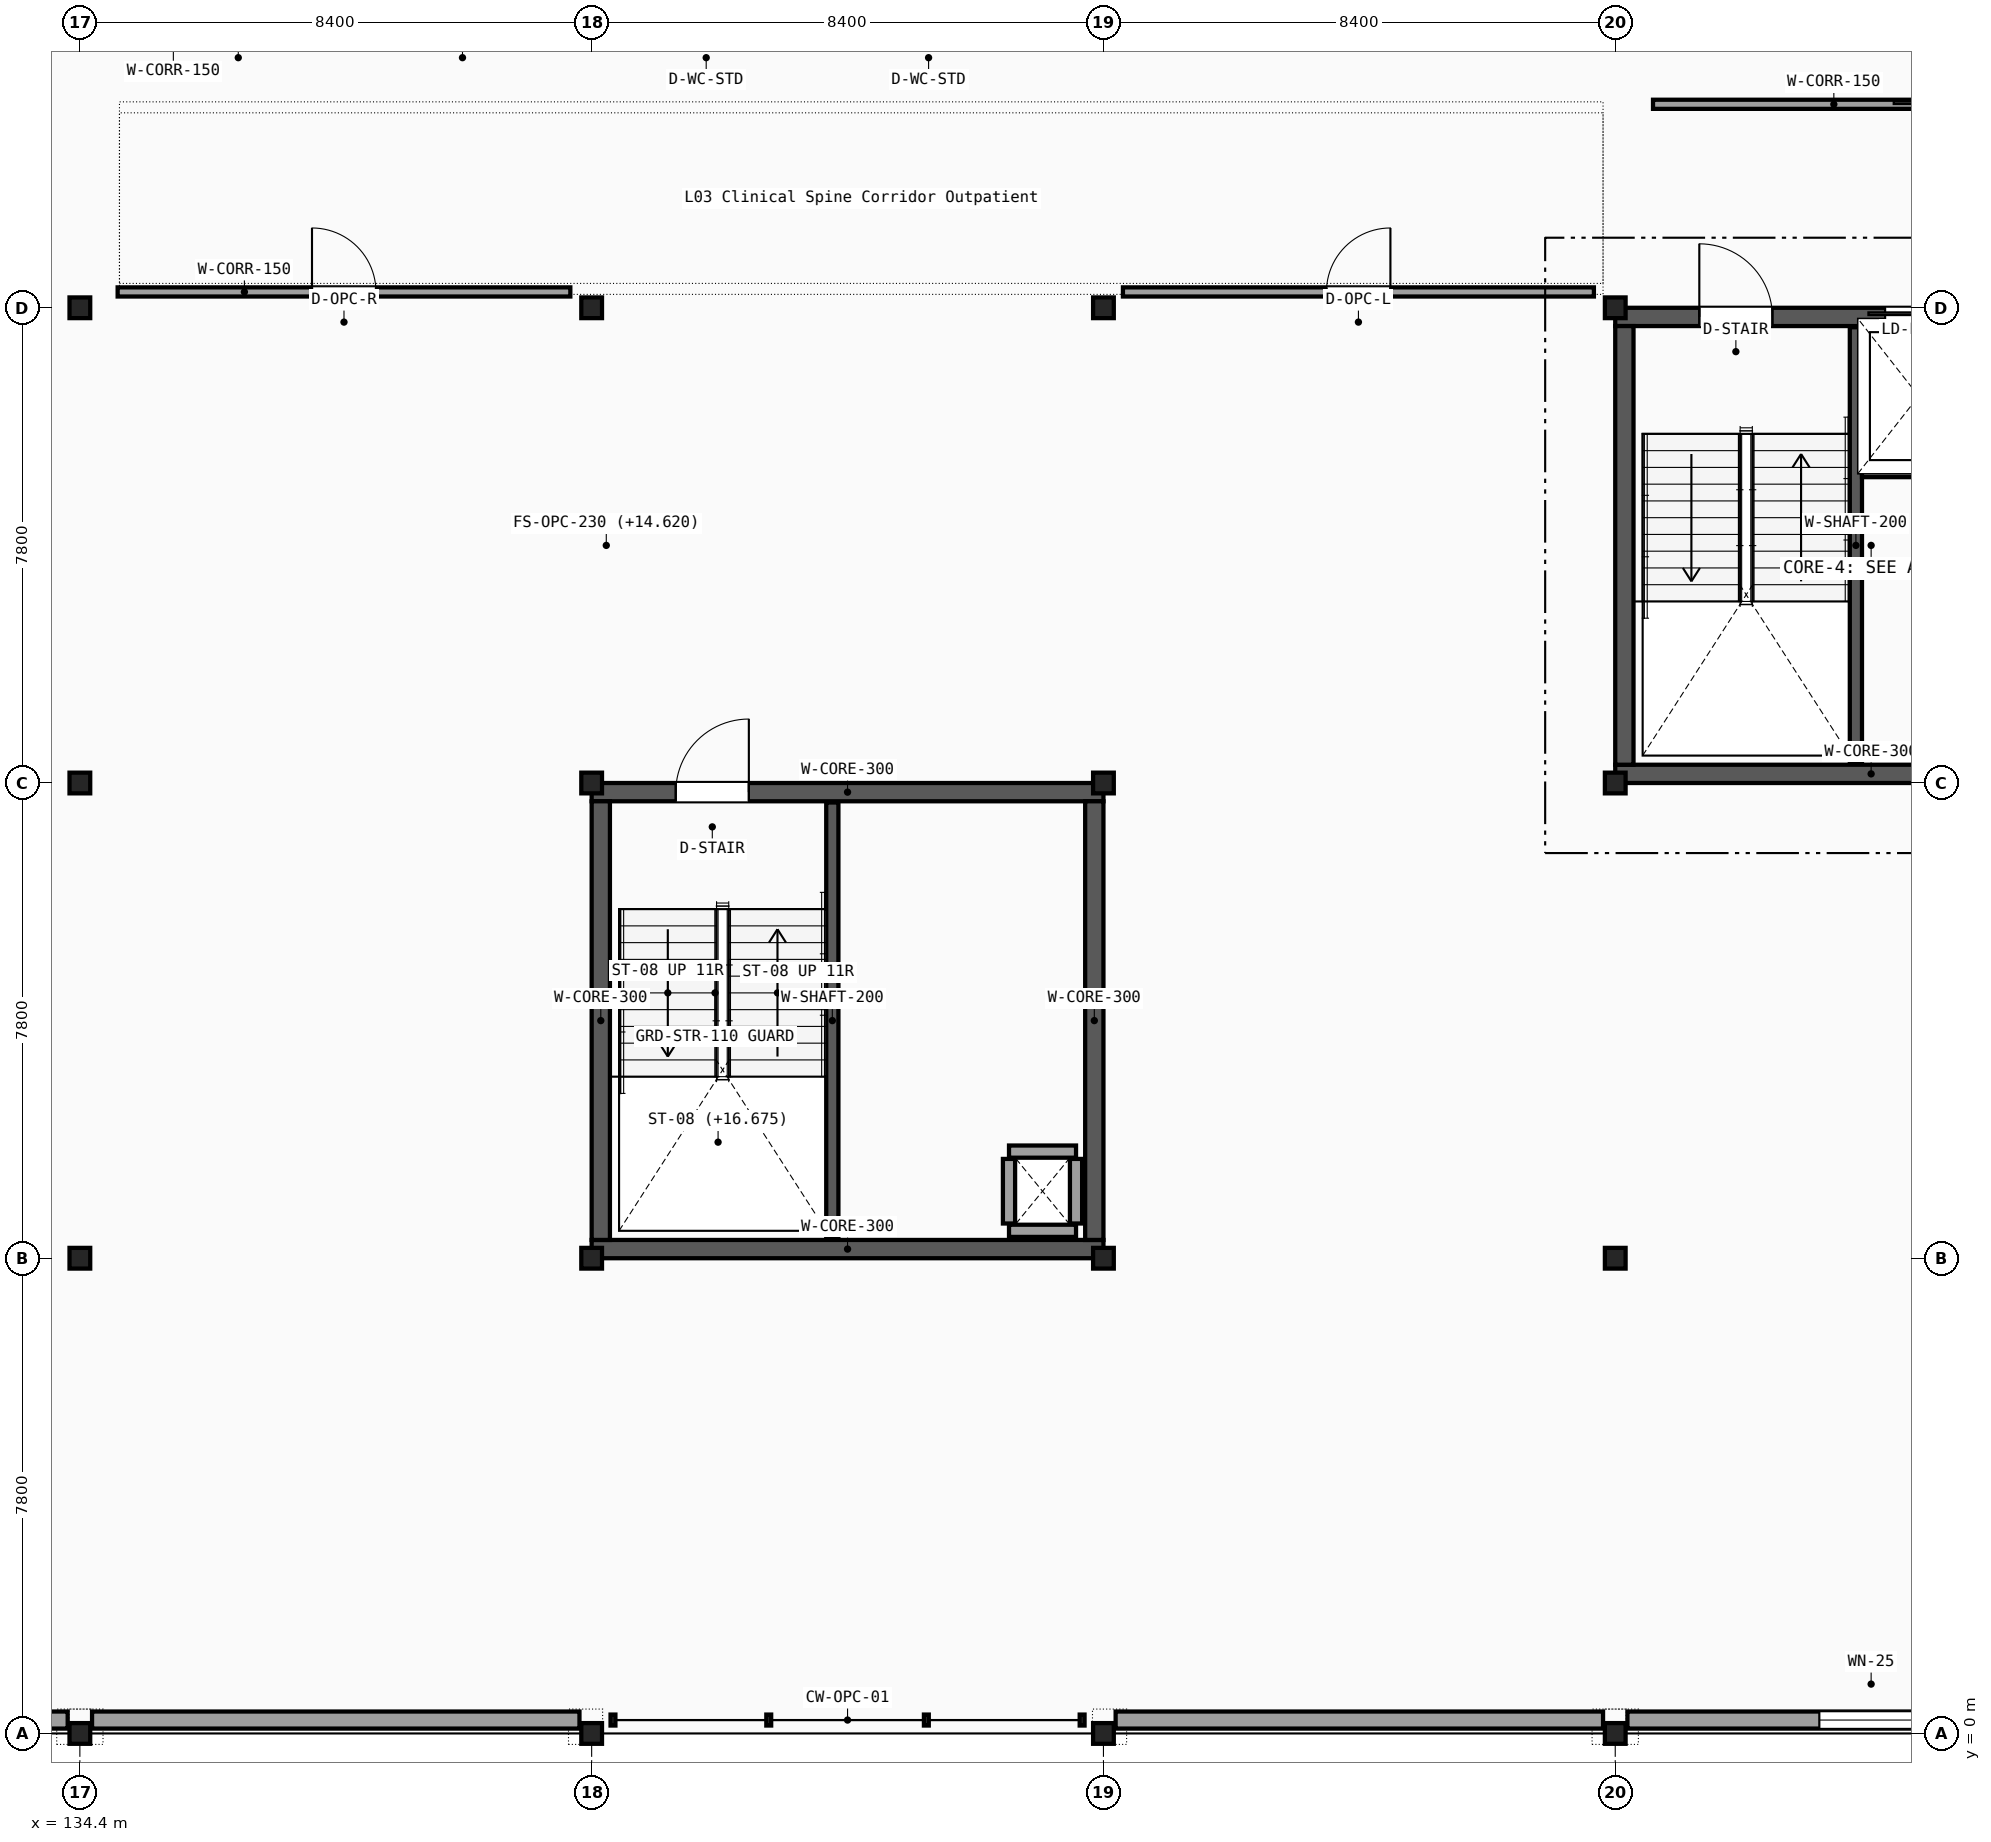
"""IFC4 building model, lengths in metres.
Left out: names, types, materials, properties, quantities, classifications, styles, units other than length and angle.
Written with IfcOpenShell. Run it as: python <this file> out.ifc"""

import sys

from ifc_helpers import new_model, si_unit, direction, frame, frame_2d, origin, origin_2d, place, context, subcontext, project, spatial, rectangle, i_section, extrude, element, fill, save


model = new_model("IFC4")
c1 = context("Model", 3, precision=1e-05, world=origin(), true_north=direction((0.0, 1.0)))
c2 = subcontext(c1, "Body", "Model", "MODEL_VIEW")
j1 = project(units=[si_unit("LENGTHUNIT", "METRE"), si_unit("PLANEANGLEUNIT", "RADIAN")], contexts=[c1])
p1 = place(None, origin())
s1 = spatial("IfcSite", under=j1, at=p1, CompositionType="ELEMENT")
p2 = place(p1, origin())
s2 = spatial("IfcBuilding", under=s1, at=p2, CompositionType="ELEMENT")
p3 = place(p2, frame((0.0, 0.0, 14.85)))
s3 = spatial("IfcBuildingStorey", under=s2, at=p3, CompositionType="ELEMENT", Elevation=14.85)
for number, where, z_axis, x_axis in (
    (1, (134.4, 0.0, 0.0), (0.0, 0.0, 1.0), (1.0, 0.0, 0.0)),
    (2, (134.4, 7.8, 0.0), (0.0, 0.0, 1.0), (1.0, 0.0, 0.0)),
    (3, (134.4, 15.6, 0.0), (0.0, 0.0, 1.0), (1.0, 0.0, 0.0)),
    (4, (134.4, 23.4, 0.0), (0.0, 0.0, 1.0), (1.0, 0.0, 0.0)),
    (5, (142.8, 0.0, 0.0), (0.0, 0.0, 1.0), (1.0, 0.0, 0.0)),
    (6, (142.8, 7.8, 0.0), (0.0, 0.0, 1.0), (1.0, 0.0, 0.0)),
    (7, (142.8, 15.6, 0.0), (0.0, 0.0, 1.0), (1.0, 0.0, 0.0)),
    (8, (142.8, 23.4, 0.0), (0.0, 0.0, 1.0), (1.0, 0.0, 0.0)),
    (9, (151.2, 0.0, 0.0), (0.0, 0.0, 1.0), (1.0, 0.0, 0.0)),
    (10, (151.2, 7.8, 0.0), (0.0, 0.0, 1.0), (1.0, 0.0, 0.0)),
    (11, (151.2, 15.6, 0.0), (0.0, 0.0, 1.0), (1.0, 0.0, 0.0)),
    (12, (151.2, 23.4, 0.0), (0.0, 0.0, 1.0), (1.0, 0.0, 0.0)),
    (13, (159.6, 0.0, 0.0), (0.0, 0.0, 1.0), (1.0, 0.0, 0.0)),
    (14, (159.6, 7.8, 0.0), (0.0, 0.0, 1.0), (1.0, 0.0, 0.0)),
    (15, (159.6, 15.6, 0.0), (0.0, 0.0, 1.0), (1.0, 0.0, 0.0)),
    (16, (159.6, 23.4, 0.0), (0.0, 0.0, 1.0), (1.0, 0.0, 0.0)),
):
    element("IfcColumn", number, at=place(p3, frame(where, z_axis=z_axis, x_axis=x_axis)), inside=s3, PredefinedType="COLUMN", context=c2, shape_type="SweptSolid", body=[
        extrude(i_section(OverallWidth=0.3, OverallDepth=0.34, WebThickness=0.012, FlangeThickness=0.021, FilletRadius=0.027, at=origin_2d()), origin(), (0.0, 0.0, 1.0), 4.05),
    ])
p4 = place(p3, frame((126.2, 0.22, 0.0), z_axis=(0.0, 0.0, 1.0), x_axis=(1.0, 0.0, 0.0)))
e17 = element("IfcWall", 17, at=p4, inside=s3, PredefinedType="SOLIDWALL", context=c2, shape_type="SweptSolid", body=[
    extrude(rectangle(XDim=8.0, YDim=0.28, at=frame_2d((4.0, 0.0))), origin(), (0.0, 0.0, 1.0), 3.42),
])
p5 = place(p4, frame((3.225, 0.0, 0.8)))
e18 = element("IfcOpeningElement", 18, at=p5, cuts=e17, PredefinedType="OPENING", context=c2, shape_type="SweptSolid", body=[
    extrude(rectangle(XDim=1.55, YDim=1.7, at=frame_2d((0.775, 0.85))), frame((0.0, 0.15, 0.0), z_axis=(0.0, -1.0, 0.0), x_axis=(1.0, 0.0, 0.0)), (0.0, 0.0, 1.0), 0.3),
])
p6 = place(p3, frame((134.6, 0.22, 0.0), z_axis=(0.0, 0.0, 1.0), x_axis=(1.0, 0.0, 0.0)))
e19 = element("IfcWall", 19, at=p6, inside=s3, PredefinedType="SOLIDWALL", context=c2, shape_type="SweptSolid", body=[
    extrude(rectangle(XDim=8.0, YDim=0.28, at=frame_2d((4.0, 0.0))), origin(), (0.0, 0.0, 1.0), 3.41),
])
p7 = place(p3, frame((151.4, 0.22, 0.0), z_axis=(0.0, 0.0, 1.0), x_axis=(1.0, 0.0, 0.0)))
e20 = element("IfcWall", 20, at=p7, inside=s3, PredefinedType="SOLIDWALL", context=c2, shape_type="SweptSolid", body=[
    extrude(rectangle(XDim=8.0, YDim=0.28, at=frame_2d((4.0, 0.0))), origin(), (0.0, 0.0, 1.0), 3.4),
])
p8 = place(p3, frame((159.8, 0.22, 0.0), z_axis=(0.0, 0.0, 1.0), x_axis=(1.0, 0.0, 0.0)))
e21 = element("IfcWall", 21, at=p8, inside=s3, PredefinedType="SOLIDWALL", context=c2, shape_type="SweptSolid", body=[
    extrude(rectangle(XDim=8.0, YDim=0.28, at=frame_2d((4.0, 0.0))), origin(), (0.0, 0.0, 1.0), 3.4),
])
p9 = place(p8, frame((3.15, 0.0, 0.95)))
e22 = element("IfcOpeningElement", 22, at=p9, cuts=e21, PredefinedType="OPENING", context=c2, shape_type="SweptSolid", body=[
    extrude(rectangle(XDim=1.7, YDim=1.55, at=frame_2d((0.85, 0.775))), frame((0.0, 0.15, 0.0), z_axis=(0.0, -1.0, 0.0), x_axis=(1.0, 0.0, 0.0)), (0.0, 0.0, 1.0), 0.3),
])
p10 = place(p3, frame((159.6, 15.75, 0.0), z_axis=(0.0, 0.0, 1.0), x_axis=(1.0, 0.0, 0.0)))
e23 = element("IfcWall", 23, at=p10, inside=s3, PredefinedType="SHEAR", context=c2, shape_type="SweptSolid", body=[
    extrude(rectangle(XDim=8.4, YDim=0.3, at=frame_2d((4.2, 0.0))), origin(), (0.0, 0.0, 1.0), 3.82),
])
p11 = place(p3, frame((159.6, 23.25, 0.0), z_axis=(0.0, 0.0, 1.0), x_axis=(1.0, 0.0, 0.0)))
e24 = element("IfcWall", 24, at=p11, inside=s3, PredefinedType="SHEAR", context=c2, shape_type="SweptSolid", body=[
    extrude(rectangle(XDim=8.4, YDim=0.3, at=frame_2d((4.2, 0.0))), origin(), (0.0, 0.0, 1.0), 3.82),
])
p12 = place(p11, frame((1.38, 0.0, 0.0)))
e25 = element("IfcOpeningElement", 25, at=p12, cuts=e24, PredefinedType="OPENING", context=c2, shape_type="SweptSolid", body=[
    extrude(rectangle(XDim=1.2, YDim=2.15, at=frame_2d((0.6, 1.075))), frame((0.0, 0.16, 0.0), z_axis=(0.0, -1.0, 0.0), x_axis=(1.0, 0.0, 0.0)), (0.0, 0.0, 1.0), 0.32),
])
p13 = place(p11, frame((4.43, 0.0, 0.0)))
e26 = element("IfcOpeningElement", 26, at=p13, cuts=e24, PredefinedType="OPENING", context=c2, shape_type="SweptSolid", body=[
    extrude(rectangle(XDim=1.1, YDim=2.15, at=frame_2d((0.55, 1.075))), frame((0.0, 0.16, 0.0), z_axis=(0.0, -1.0, 0.0), x_axis=(1.0, 0.0, 0.0)), (0.0, 0.0, 1.0), 0.32),
])
p14 = place(p11, frame((6.45, 0.0, 0.0)))
e27 = element("IfcOpeningElement", 27, at=p14, cuts=e24, PredefinedType="OPENING", context=c2, shape_type="SweptSolid", body=[
    extrude(rectangle(XDim=1.1, YDim=2.15, at=frame_2d((0.55, 1.075))), frame((0.0, 0.16, 0.0), z_axis=(0.0, -1.0, 0.0), x_axis=(1.0, 0.0, 0.0)), (0.0, 0.0, 1.0), 0.32),
])
p15 = place(p3, frame((159.75, 15.9, 0.0), z_axis=(0.0, 0.0, 1.0), x_axis=(0.0, 1.0, 0.0)))
e28 = element("IfcWall", 28, at=p15, inside=s3, PredefinedType="SHEAR", context=c2, shape_type="SweptSolid", body=[
    extrude(rectangle(XDim=7.2, YDim=0.3, at=frame_2d((3.6, 0.0))), origin(), (0.0, 0.0, 1.0), 3.82),
])
p16 = place(p3, frame((163.55, 15.92, 0.0), z_axis=(0.0, 0.0, 1.0), x_axis=(0.0, 1.0, 0.0)))
e29 = element("IfcWall", 29, at=p16, inside=s3, PredefinedType="SHEAR", context=c2, shape_type="SweptSolid", body=[
    extrude(rectangle(XDim=7.16, YDim=0.2, at=frame_2d((3.58, 0.0))), origin(), (0.0, 0.0, 1.0), 3.82),
])
p17 = place(p3, frame((163.65, 20.72, 0.0), z_axis=(0.0, 0.0, 1.0), x_axis=(1.0, 0.0, 0.0)))
e30 = element("IfcWall", 30, at=p17, inside=s3, PredefinedType="PARTITIONING", context=c2, shape_type="SweptSolid", body=[
    extrude(rectangle(XDim=1.86, YDim=0.2, at=frame_2d((0.93, 0.0))), origin(), (0.0, 0.0, 1.0), 3.2),
])
p18 = place(p3, frame((142.8, 7.95, 0.0), z_axis=(0.0, 0.0, 1.0), x_axis=(1.0, 0.0, 0.0)))
e31 = element("IfcWall", 31, at=p18, inside=s3, PredefinedType="SHEAR", context=c2, shape_type="SweptSolid", body=[
    extrude(rectangle(XDim=8.4, YDim=0.3, at=frame_2d((4.2, 0.0))), origin(), (0.0, 0.0, 1.0), 3.82),
])
p19 = place(p3, frame((142.8, 15.45, 0.0), z_axis=(0.0, 0.0, 1.0), x_axis=(1.0, 0.0, 0.0)))
e32 = element("IfcWall", 32, at=p19, inside=s3, PredefinedType="SHEAR", context=c2, shape_type="SweptSolid", body=[
    extrude(rectangle(XDim=8.4, YDim=0.3, at=frame_2d((4.2, 0.0))), origin(), (0.0, 0.0, 1.0), 3.82),
])
p20 = place(p19, frame((1.38, 0.0, 0.0)))
e33 = element("IfcOpeningElement", 33, at=p20, cuts=e32, PredefinedType="OPENING", context=c2, shape_type="SweptSolid", body=[
    extrude(rectangle(XDim=1.2, YDim=2.15, at=frame_2d((0.6, 1.075))), frame((0.0, 0.16, 0.0), z_axis=(0.0, -1.0, 0.0), x_axis=(1.0, 0.0, 0.0)), (0.0, 0.0, 1.0), 0.32),
])
for number, where, z_axis, x_axis in (
    (34, (142.95, 8.1, 0.0), (0.0, 0.0, 1.0), (0.0, 1.0, 0.0)),
    (35, (151.05, 8.1, 0.0), (0.0, 0.0, 1.0), (0.0, 1.0, 0.0)),
):
    element("IfcWall", number, at=place(p3, frame(where, z_axis=z_axis, x_axis=x_axis)), inside=s3, PredefinedType="SHEAR", context=c2, shape_type="SweptSolid", body=[
        extrude(rectangle(XDim=7.2, YDim=0.3, at=frame_2d((3.6, 0.0))), origin(), (0.0, 0.0, 1.0), 3.82),
    ])
p21 = place(p3, frame((146.75, 8.12, 0.0), z_axis=(0.0, 0.0, 1.0), x_axis=(0.0, 1.0, 0.0)))
e36 = element("IfcWall", 36, at=p21, inside=s3, PredefinedType="SHEAR", context=c2, shape_type="SweptSolid", body=[
    extrude(rectangle(XDim=7.16, YDim=0.2, at=frame_2d((3.58, 0.0))), origin(), (0.0, 0.0, 1.0), 3.82),
])
for number, where, z_axis, x_axis in (
    (37, (149.65, 8.25, 0.0), (0.0, 0.0, 1.0), (1.0, 0.0, 0.0)),
    (38, (149.65, 9.55, 0.0), (0.0, 0.0, 1.0), (1.0, 0.0, 0.0)),
):
    element("IfcWall", number, at=place(p3, frame(where, z_axis=z_axis, x_axis=x_axis)), inside=s3, PredefinedType="PARTITIONING", context=c2, shape_type="SweptSolid", body=[
        extrude(rectangle(XDim=1.1, YDim=0.2, at=frame_2d((0.55, 0.0))), origin(), (0.0, 0.0, 1.0), 3.2),
    ])
for number, where, z_axis, x_axis in (
    (39, (149.65, 8.37, 0.0), (0.0, 0.0, 1.0), (0.0, 1.0, 0.0)),
    (40, (150.75, 8.37, 0.0), (0.0, 0.0, 1.0), (0.0, 1.0, 0.0)),
):
    element("IfcWall", number, at=place(p3, frame(where, z_axis=z_axis, x_axis=x_axis)), inside=s3, PredefinedType="PARTITIONING", context=c2, shape_type="SweptSolid", body=[
        extrude(rectangle(XDim=1.06, YDim=0.2, at=frame_2d((0.53, 0.0))), origin(), (0.0, 0.0, 1.0), 3.2),
    ])
p22 = place(p3, frame((135.02, 23.66, 0.0), z_axis=(0.0, 0.0, 1.0), x_axis=(1.0, 0.0, 0.0)))
e41 = element("IfcWall", 41, at=p22, inside=s3, PredefinedType="PARTITIONING", context=c2, shape_type="SweptSolid", body=[
    extrude(rectangle(XDim=7.43, YDim=0.15, at=frame_2d((3.715, 0.0))), origin(), (0.0, 0.0, 1.0), 3.42),
])
p23 = place(p22, frame((3.19, 0.0, 0.0)))
e42 = element("IfcOpeningElement", 42, at=p23, cuts=e41, PredefinedType="OPENING", context=c2, shape_type="SweptSolid", body=[
    extrude(rectangle(XDim=1.05, YDim=2.15, at=frame_2d((0.525, 1.075))), frame((0.0, 0.085, 0.0), z_axis=(0.0, -1.0, 0.0), x_axis=(1.0, 0.0, 0.0)), (0.0, 0.0, 1.0), 0.17),
])
p24 = place(p3, frame((151.52, 23.66, 0.0), z_axis=(0.0, 0.0, 1.0), x_axis=(1.0, 0.0, 0.0)))
e43 = element("IfcWall", 43, at=p24, inside=s3, PredefinedType="PARTITIONING", context=c2, shape_type="SweptSolid", body=[
    extrude(rectangle(XDim=7.73, YDim=0.15, at=frame_2d((3.865, 0.0))), origin(), (0.0, 0.0, 1.0), 3.2),
])
p25 = place(p24, frame((3.34, 0.0, 0.0)))
e44 = element("IfcOpeningElement", 44, at=p25, cuts=e43, PredefinedType="OPENING", context=c2, shape_type="SweptSolid", body=[
    extrude(rectangle(XDim=1.05, YDim=2.15, at=frame_2d((0.525, 1.075))), frame((0.0, 0.085, 0.0), z_axis=(0.0, -1.0, 0.0), x_axis=(1.0, 0.0, 0.0)), (0.0, 0.0, 1.0), 0.17),
])
p26 = place(p3, frame((160.22, 26.74, 0.0), z_axis=(0.0, 0.0, 1.0), x_axis=(1.0, 0.0, 0.0)))
e45 = element("IfcWall", 45, at=p26, inside=s3, PredefinedType="PARTITIONING", context=c2, shape_type="SweptSolid", body=[
    extrude(rectangle(XDim=10.6, YDim=0.15, at=frame_2d((5.3, 0.0))), origin(), (0.0, 0.0, 1.0), 3.4),
])
p27 = place(p26, frame((4.4, 0.0, 0.0)))
e46 = element("IfcOpeningElement", 46, at=p27, cuts=e45, PredefinedType="OPENING", context=c2, shape_type="SweptSolid", body=[
    extrude(rectangle(XDim=1.8, YDim=2.4, at=frame_2d((0.9, 1.2))), frame((0.0, 0.085, 0.0), z_axis=(0.0, -1.0, 0.0), x_axis=(1.0, 0.0, 0.0)), (0.0, 0.0, 1.0), 0.17),
])
p28 = place(p9, origin())
e47 = element("IfcWindow", 47, at=p28, inside=s3, PartitioningType="SINGLE_PANEL", PredefinedType="WINDOW", context=c2, shape_type="SweptSolid", body=[
    extrude(rectangle(XDim=1.7, YDim=1.55, at=frame_2d((0.85, 0.775))), frame((0.0, 0.03, 0.0), z_axis=(0.0, -1.0, 0.0), x_axis=(1.0, 0.0, 0.0)), (0.0, 0.0, 1.0), 0.06),
])
fill(e22, e47)
p29 = place(p12, origin())
e48 = element("IfcDoor", 48, at=p29, inside=s3, OperationType="SINGLE_SWING_LEFT", PredefinedType="DOOR", context=c2, shape_type="SweptSolid", body=[
    extrude(rectangle(XDim=1.2, YDim=2.15, at=frame_2d((0.6, 1.075))), frame((0.0, 0.025, 0.0), z_axis=(0.0, -1.0, 0.0), x_axis=(1.0, 0.0, 0.0)), (0.0, 0.0, 1.0), 0.05),
])
fill(e25, e48)
p30 = place(p13, origin())
e49 = element("IfcDoor", 49, at=p30, inside=s3, OperationType="DOUBLE_DOOR_SLIDING", PredefinedType="DOOR", context=c2, shape_type="SweptSolid", body=[
    extrude(rectangle(XDim=1.1, YDim=2.15, at=frame_2d((0.55, 1.075))), frame((0.0, 0.025, 0.0), z_axis=(0.0, -1.0, 0.0), x_axis=(1.0, 0.0, 0.0)), (0.0, 0.0, 1.0), 0.05),
])
fill(e26, e49)
p31 = place(p20, origin())
e50 = element("IfcDoor", 50, at=p31, inside=s3, OperationType="SINGLE_SWING_RIGHT", PredefinedType="DOOR", context=c2, shape_type="SweptSolid", body=[
    extrude(rectangle(XDim=1.2, YDim=2.15, at=frame_2d((0.6, 1.075))), frame((0.0, 0.025, 0.0), z_axis=(0.0, -1.0, 0.0), x_axis=(1.0, 0.0, 0.0)), (0.0, 0.0, 1.0), 0.05),
])
fill(e33, e50)
p32 = place(p23, origin())
e51 = element("IfcDoor", 51, at=p32, inside=s3, OperationType="SINGLE_SWING_LEFT", PredefinedType="DOOR", context=c2, shape_type="SweptSolid", body=[
    extrude(rectangle(XDim=1.05, YDim=2.15, at=frame_2d((0.525, 1.075))), frame((0.0, 0.025, 0.0), z_axis=(0.0, -1.0, 0.0), x_axis=(1.0, 0.0, 0.0)), (0.0, 0.0, 1.0), 0.05),
])
fill(e42, e51)
p33 = place(p25, origin())
e52 = element("IfcDoor", 52, at=p33, inside=s3, OperationType="SINGLE_SWING_RIGHT", PredefinedType="DOOR", context=c2, shape_type="SweptSolid", body=[
    extrude(rectangle(XDim=1.05, YDim=2.15, at=frame_2d((0.525, 1.075))), frame((0.0, 0.025, 0.0), z_axis=(0.0, -1.0, 0.0), x_axis=(1.0, 0.0, 0.0)), (0.0, 0.0, 1.0), 0.05),
])
fill(e44, e52)
save(model, sys.argv[1])
